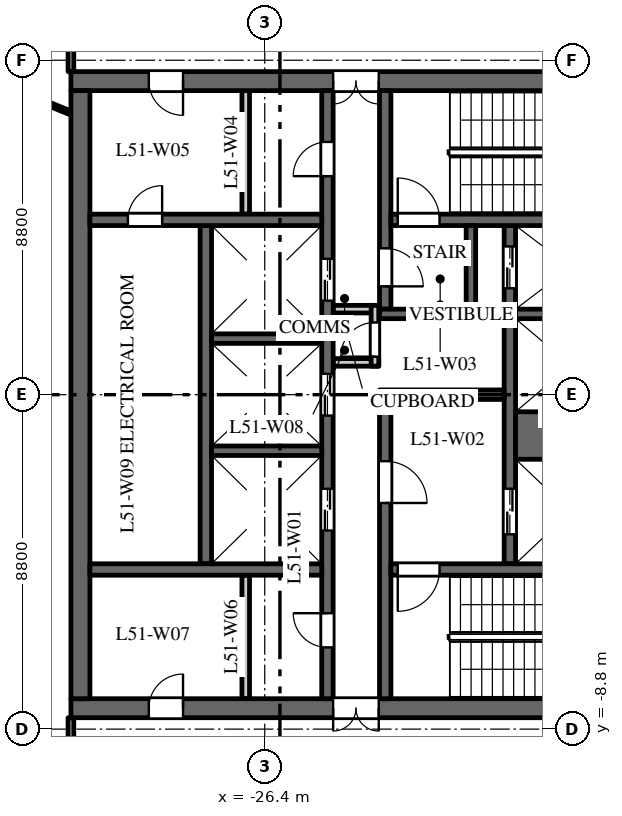
"""IFC4 building model, lengths in metres.
Left out: names, types, materials, properties, quantities, classifications, styles, units other than length and angle.
Written with IfcOpenShell. Run it as: python <this file> out.ifc"""

import sys

from ifc_helpers import new_model, si_unit, direction, frame, frame_2d, origin, place, context, subcontext, project, spatial, rectangle, extrude, element, fill, save


model = new_model("IFC4")
c1 = context("Model", 3, precision=1e-05, world=origin(), true_north=direction((0.0, 1.0)))
c2 = subcontext(c1, "Body", "Model", "MODEL_VIEW")
j1 = project(units=[si_unit("LENGTHUNIT", "METRE"), si_unit("PLANEANGLEUNIT", "RADIAN")], contexts=[c1])
p1 = place(None, origin())
s1 = spatial("IfcSite", under=j1, at=p1, CompositionType="ELEMENT")
p2 = place(p1, origin())
s2 = spatial("IfcBuilding", under=s1, at=p2, CompositionType="ELEMENT")
p3 = place(p2, frame((0.0, 0.0, 245.5)))
s3 = spatial("IfcBuildingStorey", under=s2, at=p3, CompositionType="ELEMENT", Elevation=245.5)
p4 = place(p3, frame((-16.5, 8.25, 0.0), z_axis=(0.0, 0.0, 1.0), x_axis=(-1.0, 0.0, 0.0)))
e1 = element("IfcWall", 1, at=p4, inside=s3, PredefinedType="SHEAR", context=c2, shape_type="SweptSolid", body=[
    extrude(rectangle(XDim=15.0, YDim=0.5, at=frame_2d((7.5, 0.0))), origin(), (0.0, 0.0, 1.0), 3.7),
])
p5 = place(p4, frame((6.9, 0.0, 0.0)))
e2 = element("IfcOpeningElement", 2, at=p5, cuts=e1, PredefinedType="OPENING", context=c2, shape_type="SweptSolid", body=[
    extrude(rectangle(XDim=1.2, YDim=2.1, at=frame_2d((0.6, 1.05))), frame((0.0, 0.26, 0.0), z_axis=(0.0, -1.0, 0.0), x_axis=(1.0, 0.0, 0.0)), (0.0, 0.0, 1.0), 0.52),
])
p6 = place(p4, frame((12.05, 0.0, 0.0)))
e3 = element("IfcOpeningElement", 3, at=p6, cuts=e1, PredefinedType="OPENING", context=c2, shape_type="SweptSolid", body=[
    extrude(rectangle(XDim=0.9, YDim=2.1, at=frame_2d((0.45, 1.05))), frame((0.0, 0.26, 0.0), z_axis=(0.0, -1.0, 0.0), x_axis=(1.0, 0.0, 0.0)), (0.0, 0.0, 1.0), 0.52),
])
p7 = place(p3, frame((-16.5, -8.25, 0.0), z_axis=(0.0, 0.0, 1.0), x_axis=(-1.0, 0.0, 0.0)))
e4 = element("IfcWall", 4, at=p7, inside=s3, PredefinedType="SHEAR", context=c2, shape_type="SweptSolid", body=[
    extrude(rectangle(XDim=15.0, YDim=0.5, at=frame_2d((7.5, 0.0))), origin(), (0.0, 0.0, 1.0), 3.7),
])
p8 = place(p7, frame((6.9, 0.0, 0.0)))
e5 = element("IfcOpeningElement", 5, at=p8, cuts=e4, PredefinedType="OPENING", context=c2, shape_type="SweptSolid", body=[
    extrude(rectangle(XDim=1.2, YDim=2.1, at=frame_2d((0.6, 1.05))), frame((0.0, 0.26, 0.0), z_axis=(0.0, -1.0, 0.0), x_axis=(1.0, 0.0, 0.0)), (0.0, 0.0, 1.0), 0.52),
])
p9 = place(p7, frame((12.05, 0.0, 0.0)))
e6 = element("IfcOpeningElement", 6, at=p9, cuts=e4, PredefinedType="OPENING", context=c2, shape_type="SweptSolid", body=[
    extrude(rectangle(XDim=0.9, YDim=2.1, at=frame_2d((0.45, 1.05))), frame((0.0, 0.26, 0.0), z_axis=(0.0, -1.0, 0.0), x_axis=(1.0, 0.0, 0.0)), (0.0, 0.0, 1.0), 0.52),
])
p10 = place(p3, frame((-27.95, -4.45, 0.0), z_axis=(0.0, 0.0, 1.0), x_axis=(0.0, 1.0, 0.0)))
e7 = element("IfcWall", 7, at=p10, inside=s3, PredefinedType="SHEAR", context=c2, shape_type="SweptSolid", body=[
    extrude(rectangle(XDim=8.9, YDim=0.3, at=frame_2d((4.45, 0.0))), origin(), (0.0, 0.0, 1.0), 3.7),
])
p11 = place(p3, frame((-19.95, -4.45, 0.0), z_axis=(0.0, 0.0, 1.0), x_axis=(0.0, 1.0, 0.0)))
e8 = element("IfcWall", 8, at=p11, inside=s3, PredefinedType="SHEAR", context=c2, shape_type="SweptSolid", body=[
    extrude(rectangle(XDim=8.9, YDim=0.3, at=frame_2d((4.45, 0.0))), origin(), (0.0, 0.0, 1.0), 3.7),
])
p12 = place(p11, frame((0.775, 0.0, 0.0)))
e9 = element("IfcOpeningElement", 9, at=p12, cuts=e8, PredefinedType="OPENING", context=c2, shape_type="SweptSolid", body=[
    extrude(rectangle(XDim=1.2, YDim=2.1, at=frame_2d((0.6, 1.05))), frame((0.0, 0.16, 0.0), z_axis=(0.0, -1.0, 0.0), x_axis=(1.0, 0.0, 0.0)), (0.0, 0.0, 1.0), 0.32),
])
p13 = place(p11, frame((7.25, 0.0, 0.0)))
e10 = element("IfcOpeningElement", 10, at=p13, cuts=e8, PredefinedType="OPENING", context=c2, shape_type="SweptSolid", body=[
    extrude(rectangle(XDim=1.1, YDim=2.1, at=frame_2d((0.55, 1.05))), frame((0.0, 0.16, 0.0), z_axis=(0.0, -1.0, 0.0), x_axis=(1.0, 0.0, 0.0)), (0.0, 0.0, 1.0), 0.32),
])
p14 = place(p3, frame((-24.75, -8.0, 0.0), z_axis=(0.0, 0.0, 1.0), x_axis=(0.0, 1.0, 0.0)))
e11 = element("IfcWall", 11, at=p14, inside=s3, PredefinedType="SHEAR", context=c2, shape_type="SweptSolid", body=[
    extrude(rectangle(XDim=16.0, YDim=0.3, at=frame_2d((8.0, 0.0))), origin(), (0.0, 0.0, 1.0), 3.7),
])
p15 = place(p14, frame((4.425, 0.0, 0.0)))
e12 = element("IfcOpeningElement", 12, at=p15, cuts=e11, PredefinedType="OPENING", context=c2, shape_type="SweptSolid", body=[
    extrude(rectangle(XDim=1.1, YDim=2.1, at=frame_2d((0.55, 1.05))), frame((0.0, 0.16, 0.0), z_axis=(0.0, -1.0, 0.0), x_axis=(1.0, 0.0, 0.0)), (0.0, 0.0, 1.0), 0.32),
])
p16 = place(p14, frame((7.45, 0.0, 0.0)))
e13 = element("IfcOpeningElement", 13, at=p16, cuts=e11, PredefinedType="OPENING", context=c2, shape_type="SweptSolid", body=[
    extrude(rectangle(XDim=1.1, YDim=2.1, at=frame_2d((0.55, 1.05))), frame((0.0, 0.16, 0.0), z_axis=(0.0, -1.0, 0.0), x_axis=(1.0, 0.0, 0.0)), (0.0, 0.0, 1.0), 0.32),
])
p17 = place(p14, frame((10.475, 0.0, 0.0)))
e14 = element("IfcOpeningElement", 14, at=p17, cuts=e11, PredefinedType="OPENING", context=c2, shape_type="SweptSolid", body=[
    extrude(rectangle(XDim=1.1, YDim=2.1, at=frame_2d((0.55, 1.05))), frame((0.0, 0.16, 0.0), z_axis=(0.0, -1.0, 0.0), x_axis=(1.0, 0.0, 0.0)), (0.0, 0.0, 1.0), 0.32),
])
p18 = place(p14, frame((13.75, 0.0, 0.0)))
e15 = element("IfcOpeningElement", 15, at=p18, cuts=e11, PredefinedType="OPENING", context=c2, shape_type="SweptSolid", body=[
    extrude(rectangle(XDim=0.9, YDim=2.1, at=frame_2d((0.45, 1.05))), frame((0.0, 0.16, 0.0), z_axis=(0.0, -1.0, 0.0), x_axis=(1.0, 0.0, 0.0)), (0.0, 0.0, 1.0), 0.32),
])
p19 = place(p14, frame((1.35, 0.0, 0.0)))
e16 = element("IfcOpeningElement", 16, at=p19, cuts=e11, PredefinedType="OPENING", context=c2, shape_type="SweptSolid", body=[
    extrude(rectangle(XDim=0.9, YDim=2.1, at=frame_2d((0.45, 1.05))), frame((0.0, 0.16, 0.0), z_axis=(0.0, -1.0, 0.0), x_axis=(1.0, 0.0, 0.0)), (0.0, 0.0, 1.0), 0.32),
])
p20 = place(p3, frame((-20.1, 0.0, 0.0), z_axis=(0.0, 0.0, 1.0), x_axis=(-1.0, 0.0, 0.0)))
e17 = element("IfcWall", 17, at=p20, inside=s3, PredefinedType="SHEAR", context=c2, shape_type="SweptSolid", body=[
    extrude(rectangle(XDim=3.28, YDim=0.25, at=frame_2d((1.64, 0.0))), origin(), (0.0, 0.0, 1.0), 3.7),
])
for number, where, z_axis, x_axis in (
    (18, (-23.4, 0.85, 0.0), (0.0, 0.0, 1.0), (-1.0, 0.0, 0.0)),
    (19, (-23.4, 2.25, 0.0), (0.0, 0.0, 1.0), (-1.0, 0.0, 0.0)),
):
    element("IfcWall", number, at=place(p3, frame(where, z_axis=z_axis, x_axis=x_axis)), inside=s3, PredefinedType="PARTITIONING", context=c2, shape_type="SweptSolid", body=[
        extrude(rectangle(XDim=1.2, YDim=0.2, at=frame_2d((0.6, 0.0))), origin(), (0.0, 0.0, 1.0), 3.7),
    ])
p21 = place(p3, frame((-23.5, 0.75, 0.0), z_axis=(0.0, 0.0, 1.0), x_axis=(0.0, 1.0, 0.0)))
e20 = element("IfcWall", 20, at=p21, inside=s3, PredefinedType="PARTITIONING", context=c2, shape_type="SweptSolid", body=[
    extrude(rectangle(XDim=1.6, YDim=0.2, at=frame_2d((0.8, 0.0))), origin(), (0.0, 0.0, 1.0), 3.7),
])
p22 = place(p21, frame((0.25, 0.0, 0.0)))
e21 = element("IfcOpeningElement", 21, at=p22, cuts=e20, PredefinedType="OPENING", context=c2, shape_type="SweptSolid", body=[
    extrude(rectangle(XDim=0.9, YDim=2.1, at=frame_2d((0.45, 1.05))), frame((0.0, 0.11, 0.0), z_axis=(0.0, -1.0, 0.0), x_axis=(1.0, 0.0, 0.0)), (0.0, 0.0, 1.0), 0.22),
])
p23 = place(p3, frame((-31.25, -8.0, 0.0), z_axis=(0.0, 0.0, 1.0), x_axis=(0.0, 1.0, 0.0)))
e22 = element("IfcWall", 22, at=p23, inside=s3, PredefinedType="SHEAR", context=c2, shape_type="SweptSolid", body=[
    extrude(rectangle(XDim=16.0, YDim=0.5, at=frame_2d((8.0, 0.0))), origin(), (0.0, 0.0, 1.0), 3.7),
])
p24 = place(p3, frame((-24.9, 4.6, 0.0), z_axis=(0.0, 0.0, 1.0), x_axis=(-1.0, 0.0, 0.0)))
e23 = element("IfcWall", 23, at=p24, inside=s3, PredefinedType="SHEAR", context=c2, shape_type="SweptSolid", body=[
    extrude(rectangle(XDim=6.1, YDim=0.3, at=frame_2d((3.05, 0.0))), origin(), (0.0, 0.0, 1.0), 3.7),
])
p25 = place(p24, frame((4.2, 0.0, 0.0)))
e24 = element("IfcOpeningElement", 24, at=p25, cuts=e23, PredefinedType="OPENING", context=c2, shape_type="SweptSolid", body=[
    extrude(rectangle(XDim=0.9, YDim=2.1, at=frame_2d((0.45, 1.05))), frame((0.0, 0.16, 0.0), z_axis=(0.0, -1.0, 0.0), x_axis=(1.0, 0.0, 0.0)), (0.0, 0.0, 1.0), 0.32),
])
for number, where, z_axis, x_axis in (
    (25, (-26.9, 4.75, 0.0), (0.0, 0.0, 1.0), (0.0, 1.0, 0.0)),
    (26, (-26.9, -8.0, 0.0), (0.0, 0.0, 1.0), (0.0, 1.0, 0.0)),
):
    element("IfcWall", number, at=place(p3, frame(where, z_axis=z_axis, x_axis=x_axis)), inside=s3, PredefinedType="PARTITIONING", context=c2, shape_type="SweptSolid", body=[
        extrude(rectangle(XDim=3.25, YDim=0.2, at=frame_2d((1.625, 0.0))), origin(), (0.0, 0.0, 1.0), 3.7),
    ])
p26 = place(p3, frame((-24.9, -4.6, 0.0), z_axis=(0.0, 0.0, 1.0), x_axis=(-1.0, 0.0, 0.0)))
e27 = element("IfcWall", 27, at=p26, inside=s3, PredefinedType="SHEAR", context=c2, shape_type="SweptSolid", body=[
    extrude(rectangle(XDim=6.1, YDim=0.3, at=frame_2d((3.05, 0.0))), origin(), (0.0, 0.0, 1.0), 3.7),
])
p27 = place(p3, frame((-16.9, -1.075, 0.0), z_axis=(0.0, 0.0, 1.0), x_axis=(-1.0, 0.0, 0.0)))
e28 = element("IfcWall", 28, at=p27, inside=s3, PredefinedType="SHEAR", context=c2, shape_type="SweptSolid", body=[
    extrude(rectangle(XDim=2.9, YDim=1.25, at=frame_2d((1.45, 0.0))), origin(), (0.0, 0.0, 1.0), 3.7),
])
for number, where, z_axis, x_axis in (
    (29, (-16.9, 2.125, 0.0), (0.0, 0.0, 1.0), (-1.0, 0.0, 0.0)),
    (30, (-24.9, -1.475, 0.0), (0.0, 0.0, 1.0), (-1.0, 0.0, 0.0)),
    (31, (-24.9, 1.475, 0.0), (0.0, 0.0, 1.0), (-1.0, 0.0, 0.0)),
):
    element("IfcWall", number, at=place(p3, frame(where, z_axis=z_axis, x_axis=x_axis)), inside=s3, PredefinedType="SHEAR", context=c2, shape_type="SweptSolid", body=[
        extrude(rectangle(XDim=2.9, YDim=0.25, at=frame_2d((1.45, 0.0))), origin(), (0.0, 0.0, 1.0), 3.7),
    ])
p28 = place(p3, frame((-23.23, 2.25, 0.0), z_axis=(0.0, 0.0, 1.0), x_axis=(0.0, 1.0, 0.0)))
e32 = element("IfcWall", 32, at=p28, inside=s3, PredefinedType="SHEAR", context=c2, shape_type="SweptSolid", body=[
    extrude(rectangle(XDim=5.75, YDim=0.3, at=frame_2d((2.875, 0.0))), origin(), (0.0, 0.0, 1.0), 3.7),
])
p29 = place(p28, frame((0.6, 0.0, 0.0)))
e33 = element("IfcOpeningElement", 33, at=p29, cuts=e32, PredefinedType="OPENING", context=c2, shape_type="SweptSolid", body=[
    extrude(rectangle(XDim=1.0, YDim=2.1, at=frame_2d((0.5, 1.05))), frame((0.0, 0.16, 0.0), z_axis=(0.0, -1.0, 0.0), x_axis=(1.0, 0.0, 0.0)), (0.0, 0.0, 1.0), 0.32),
])
p30 = place(p3, frame((-23.23, -8.0, 0.0), z_axis=(0.0, 0.0, 1.0), x_axis=(0.0, 1.0, 0.0)))
e34 = element("IfcWall", 34, at=p30, inside=s3, PredefinedType="SHEAR", context=c2, shape_type="SweptSolid", body=[
    extrude(rectangle(XDim=7.875, YDim=0.3, at=frame_2d((3.938, 0.0))), origin(), (0.0, 0.0, 1.0), 3.7),
])
p31 = place(p30, frame((5.15, 0.0, 0.0)))
e35 = element("IfcOpeningElement", 35, at=p31, cuts=e34, PredefinedType="OPENING", context=c2, shape_type="SweptSolid", body=[
    extrude(rectangle(XDim=1.1, YDim=2.1, at=frame_2d((0.55, 1.05))), frame((0.0, 0.16, 0.0), z_axis=(0.0, -1.0, 0.0), x_axis=(1.0, 0.0, 0.0)), (0.0, 0.0, 1.0), 0.32),
])
p32 = place(p3, frame((-16.9, 4.6, 0.0), z_axis=(0.0, 0.0, 1.0), x_axis=(-1.0, 0.0, 0.0)))
e36 = element("IfcWall", 36, at=p32, inside=s3, PredefinedType="SHEAR", context=c2, shape_type="SweptSolid", body=[
    extrude(rectangle(XDim=6.18, YDim=0.3, at=frame_2d((3.09, 0.0))), origin(), (0.0, 0.0, 1.0), 3.7),
])
p33 = place(p32, frame((4.9, 0.0, 0.0)))
e37 = element("IfcOpeningElement", 37, at=p33, cuts=e36, PredefinedType="OPENING", context=c2, shape_type="SweptSolid", body=[
    extrude(rectangle(XDim=1.1, YDim=2.1, at=frame_2d((0.55, 1.05))), frame((0.0, 0.16, 0.0), z_axis=(0.0, -1.0, 0.0), x_axis=(1.0, 0.0, 0.0)), (0.0, 0.0, 1.0), 0.32),
])
p34 = place(p3, frame((-16.9, -4.6, 0.0), z_axis=(0.0, 0.0, 1.0), x_axis=(-1.0, 0.0, 0.0)))
e38 = element("IfcWall", 38, at=p34, inside=s3, PredefinedType="SHEAR", context=c2, shape_type="SweptSolid", body=[
    extrude(rectangle(XDim=6.18, YDim=0.3, at=frame_2d((3.09, 0.0))), origin(), (0.0, 0.0, 1.0), 3.7),
])
p35 = place(p34, frame((4.9, 0.0, 0.0)))
e39 = element("IfcOpeningElement", 39, at=p35, cuts=e38, PredefinedType="OPENING", context=c2, shape_type="SweptSolid", body=[
    extrude(rectangle(XDim=1.1, YDim=2.1, at=frame_2d((0.55, 1.05))), frame((0.0, 0.16, 0.0), z_axis=(0.0, -1.0, 0.0), x_axis=(1.0, 0.0, 0.0)), (0.0, 0.0, 1.0), 0.32),
])
p36 = place(p3, frame((-20.85, 2.125, 0.0), z_axis=(0.0, 0.0, 1.0), x_axis=(-1.0, 0.0, 0.0)))
e40 = element("IfcWall", 40, at=p36, inside=s3, PredefinedType="SHEAR", context=c2, shape_type="SweptSolid", body=[
    extrude(rectangle(XDim=2.53, YDim=0.25, at=frame_2d((1.265, 0.0))), origin(), (0.0, 0.0, 1.0), 3.7),
])
p37 = place(p3, frame((-20.975, 2.25, 0.0), z_axis=(0.0, 0.0, 1.0), x_axis=(0.0, 1.0, 0.0)))
e41 = element("IfcWall", 41, at=p37, inside=s3, PredefinedType="SHEAR", context=c2, shape_type="SweptSolid", body=[
    extrude(rectangle(XDim=2.2, YDim=0.25, at=frame_2d((1.1, 0.0))), origin(), (0.0, 0.0, 1.0), 3.7),
])
p38 = place(p3, frame((-34.234, 8.53, 0.0), z_axis=(0.0, 0.0, 1.0), x_axis=(0.925344112436, -0.379128307542, 0.0)))
e42 = element("IfcWall", 42, at=p38, inside=s3, PredefinedType="PARTITIONING", context=c2, shape_type="SweptSolid", body=[
    extrude(rectangle(XDim=2.954, YDim=0.1, at=frame_2d((1.477, 0.0))), origin(), (0.0, 0.0, 1.0), 3.0),
])
for number, where, z_axis, x_axis in (
    (43, (-31.5, -10.7, 0.0), (0.0, 0.0, 1.0), (0.0, 1.0, 0.0)),
    (44, (-31.5, 8.5, 0.0), (0.0, 0.0, 1.0), (0.0, 1.0, 0.0)),
):
    element("IfcWall", number, at=place(p3, frame(where, z_axis=z_axis, x_axis=x_axis)), inside=s3, PredefinedType="PARTITIONING", context=c2, shape_type="SweptSolid", body=[
        extrude(rectangle(XDim=2.2, YDim=0.15, at=frame_2d((1.1, 0.0))), origin(), (0.0, 0.0, 1.0), 3.7),
    ])
p39 = place(p12, origin())
e45 = element("IfcDoor", 45, at=p39, inside=s3, OperationType="DOUBLE_DOOR_SLIDING", PredefinedType="DOOR", context=c2, shape_type="SweptSolid", body=[
    extrude(rectangle(XDim=1.2, YDim=2.1, at=frame_2d((0.6, 1.05))), frame((0.0, 0.025, 0.0), z_axis=(0.0, -1.0, 0.0), x_axis=(1.0, 0.0, 0.0)), (0.0, 0.0, 1.0), 0.05),
])
fill(e9, e45)
p40 = place(p13, origin())
e46 = element("IfcDoor", 46, at=p40, inside=s3, OperationType="DOUBLE_DOOR_SLIDING", PredefinedType="DOOR", context=c2, shape_type="SweptSolid", body=[
    extrude(rectangle(XDim=1.1, YDim=2.1, at=frame_2d((0.55, 1.05))), frame((0.0, 0.025, 0.0), z_axis=(0.0, -1.0, 0.0), x_axis=(1.0, 0.0, 0.0)), (0.0, 0.0, 1.0), 0.05),
])
fill(e10, e46)
p41 = place(p15, origin())
e47 = element("IfcDoor", 47, at=p41, inside=s3, OperationType="DOUBLE_DOOR_SLIDING", PredefinedType="DOOR", context=c2, shape_type="SweptSolid", body=[
    extrude(rectangle(XDim=1.1, YDim=2.1, at=frame_2d((0.55, 1.05))), frame((0.0, 0.025, 0.0), z_axis=(0.0, -1.0, 0.0), x_axis=(1.0, 0.0, 0.0)), (0.0, 0.0, 1.0), 0.05),
])
fill(e12, e47)
p42 = place(p16, origin())
e48 = element("IfcDoor", 48, at=p42, inside=s3, OperationType="DOUBLE_DOOR_SLIDING", PredefinedType="DOOR", context=c2, shape_type="SweptSolid", body=[
    extrude(rectangle(XDim=1.1, YDim=2.1, at=frame_2d((0.55, 1.05))), frame((0.0, 0.025, 0.0), z_axis=(0.0, -1.0, 0.0), x_axis=(1.0, 0.0, 0.0)), (0.0, 0.0, 1.0), 0.05),
])
fill(e13, e48)
p43 = place(p17, origin())
e49 = element("IfcDoor", 49, at=p43, inside=s3, OperationType="DOUBLE_DOOR_SLIDING", PredefinedType="DOOR", context=c2, shape_type="SweptSolid", body=[
    extrude(rectangle(XDim=1.1, YDim=2.1, at=frame_2d((0.55, 1.05))), frame((0.0, 0.025, 0.0), z_axis=(0.0, -1.0, 0.0), x_axis=(1.0, 0.0, 0.0)), (0.0, 0.0, 1.0), 0.05),
])
fill(e14, e49)
p44 = place(p33, origin())
e50 = element("IfcDoor", 50, at=p44, inside=s3, OperationType="SINGLE_SWING_RIGHT", PredefinedType="DOOR", context=c2, shape_type="SweptSolid", body=[
    extrude(rectangle(XDim=1.1, YDim=2.1, at=frame_2d((0.55, 1.05))), frame((0.0, 0.025, 0.0), z_axis=(0.0, -1.0, 0.0), x_axis=(1.0, 0.0, 0.0)), (0.0, 0.0, 1.0), 0.05),
])
fill(e37, e50)
p45 = place(p35, origin())
e51 = element("IfcDoor", 51, at=p45, inside=s3, OperationType="SINGLE_SWING_LEFT", PredefinedType="DOOR", context=c2, shape_type="SweptSolid", body=[
    extrude(rectangle(XDim=1.1, YDim=2.1, at=frame_2d((0.55, 1.05))), frame((0.0, 0.025, 0.0), z_axis=(0.0, -1.0, 0.0), x_axis=(1.0, 0.0, 0.0)), (0.0, 0.0, 1.0), 0.05),
])
fill(e39, e51)
p46 = place(p31, origin())
e52 = element("IfcDoor", 52, at=p46, inside=s3, OperationType="SINGLE_SWING_LEFT", PredefinedType="DOOR", context=c2, shape_type="SweptSolid", body=[
    extrude(rectangle(XDim=1.1, YDim=2.1, at=frame_2d((0.55, 1.05))), frame((0.0, 0.025, 0.0), z_axis=(0.0, -1.0, 0.0), x_axis=(1.0, 0.0, 0.0)), (0.0, 0.0, 1.0), 0.05),
])
fill(e35, e52)
p47 = place(p29, origin())
e53 = element("IfcDoor", 53, at=p47, inside=s3, OperationType="SINGLE_SWING_LEFT", PredefinedType="DOOR", context=c2, shape_type="SweptSolid", body=[
    extrude(rectangle(XDim=1.0, YDim=2.1, at=frame_2d((0.5, 1.05))), frame((0.0, 0.025, 0.0), z_axis=(0.0, -1.0, 0.0), x_axis=(1.0, 0.0, 0.0)), (0.0, 0.0, 1.0), 0.05),
])
fill(e33, e53)
p48 = place(p5, origin())
e54 = element("IfcDoor", 54, at=p48, inside=s3, OperationType="DOUBLE_DOOR_DOUBLE_SWING", PredefinedType="DOOR", context=c2, shape_type="SweptSolid", body=[
    extrude(rectangle(XDim=1.2, YDim=2.1, at=frame_2d((0.6, 1.05))), frame((0.0, 0.025, 0.0), z_axis=(0.0, -1.0, 0.0), x_axis=(1.0, 0.0, 0.0)), (0.0, 0.0, 1.0), 0.05),
])
fill(e2, e54)
p49 = place(p8, origin())
e55 = element("IfcDoor", 55, at=p49, inside=s3, OperationType="DOUBLE_DOOR_DOUBLE_SWING", PredefinedType="DOOR", context=c2, shape_type="SweptSolid", body=[
    extrude(rectangle(XDim=1.2, YDim=2.1, at=frame_2d((0.6, 1.05))), frame((0.0, 0.025, 0.0), z_axis=(0.0, -1.0, 0.0), x_axis=(1.0, 0.0, 0.0)), (0.0, 0.0, 1.0), 0.05),
])
fill(e5, e55)
p50 = place(p18, origin())
e56 = element("IfcDoor", 56, at=p50, inside=s3, OperationType="SINGLE_SWING_RIGHT", PredefinedType="DOOR", context=c2, shape_type="SweptSolid", body=[
    extrude(rectangle(XDim=0.9, YDim=2.1, at=frame_2d((0.45, 1.05))), frame((0.0, 0.025, 0.0), z_axis=(0.0, -1.0, 0.0), x_axis=(1.0, 0.0, 0.0)), (0.0, 0.0, 1.0), 0.05),
])
fill(e15, e56)
p51 = place(p6, origin())
e57 = element("IfcDoor", 57, at=p51, inside=s3, OperationType="SINGLE_SWING_RIGHT", PredefinedType="DOOR", context=c2, shape_type="SweptSolid", body=[
    extrude(rectangle(XDim=0.9, YDim=2.1, at=frame_2d((0.45, 1.05))), frame((0.0, 0.025, 0.0), z_axis=(0.0, -1.0, 0.0), x_axis=(1.0, 0.0, 0.0)), (0.0, 0.0, 1.0), 0.05),
])
fill(e3, e57)
p52 = place(p19, origin())
e58 = element("IfcDoor", 58, at=p52, inside=s3, OperationType="SINGLE_SWING_LEFT", PredefinedType="DOOR", context=c2, shape_type="SweptSolid", body=[
    extrude(rectangle(XDim=0.9, YDim=2.1, at=frame_2d((0.45, 1.05))), frame((0.0, 0.025, 0.0), z_axis=(0.0, -1.0, 0.0), x_axis=(1.0, 0.0, 0.0)), (0.0, 0.0, 1.0), 0.05),
])
fill(e16, e58)
p53 = place(p9, origin())
e59 = element("IfcDoor", 59, at=p53, inside=s3, OperationType="SINGLE_SWING_LEFT", PredefinedType="DOOR", context=c2, shape_type="SweptSolid", body=[
    extrude(rectangle(XDim=0.9, YDim=2.1, at=frame_2d((0.45, 1.05))), frame((0.0, 0.025, 0.0), z_axis=(0.0, -1.0, 0.0), x_axis=(1.0, 0.0, 0.0)), (0.0, 0.0, 1.0), 0.05),
])
fill(e6, e59)
p54 = place(p22, origin())
e60 = element("IfcDoor", 60, at=p54, inside=s3, OperationType="SINGLE_SWING_RIGHT", PredefinedType="DOOR", context=c2, shape_type="SweptSolid", body=[
    extrude(rectangle(XDim=0.9, YDim=2.1, at=frame_2d((0.45, 1.05))), frame((0.0, 0.025, 0.0), z_axis=(0.0, -1.0, 0.0), x_axis=(1.0, 0.0, 0.0)), (0.0, 0.0, 1.0), 0.05),
])
fill(e21, e60)
p55 = place(p25, origin())
e61 = element("IfcDoor", 61, at=p55, inside=s3, OperationType="SINGLE_SWING_LEFT", PredefinedType="DOOR", context=c2, shape_type="SweptSolid", body=[
    extrude(rectangle(XDim=0.9, YDim=2.1, at=frame_2d((0.45, 1.05))), frame((0.0, 0.025, 0.0), z_axis=(0.0, -1.0, 0.0), x_axis=(1.0, 0.0, 0.0)), (0.0, 0.0, 1.0), 0.05),
])
fill(e24, e61)
save(model, sys.argv[1])
